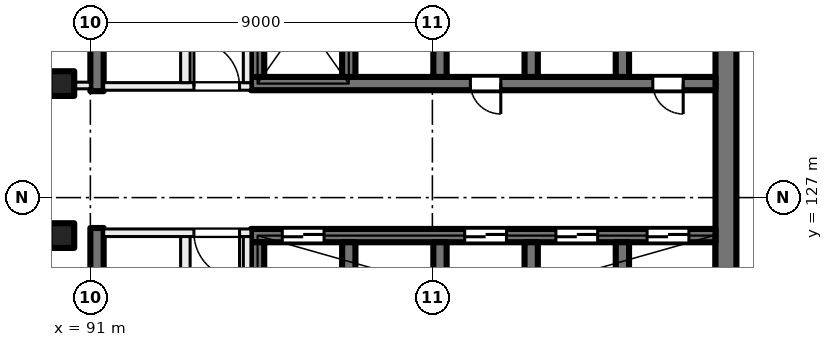
"""IFC4 building model, lengths in metres.
Left out: names, types, materials, properties, quantities, classifications, styles, units other than length and angle.
Written with IfcOpenShell. Run it as: python <this file> out.ifc"""

import sys

from ifc_helpers import new_model, si_unit, direction, frame, frame_2d, origin, origin_2d, place, context, subcontext, project, spatial, rectangle, extrude, element, fill, save


model = new_model("IFC4")
c1 = context("Model", 3, precision=1e-05, world=origin(), true_north=direction((0.0, 1.0)))
c2 = subcontext(c1, "Body", "Model", "MODEL_VIEW")
j1 = project(units=[si_unit("LENGTHUNIT", "METRE"), si_unit("PLANEANGLEUNIT", "RADIAN")], contexts=[c1])
p1 = place(None, origin())
s1 = spatial("IfcSite", under=j1, at=p1, CompositionType="ELEMENT")
p2 = place(p1, origin())
s2 = spatial("IfcBuilding", under=s1, at=p2, CompositionType="ELEMENT")
p3 = place(p2, frame((0.0, 0.0, 154.5)))
s3 = spatial("IfcBuildingStorey", under=s2, at=p3, CompositionType="ELEMENT", Elevation=154.5)
for number, where, z_axis, x_axis in (
    (1, (90.25, 130.0, 0.0), (0.0, 0.0, 1.0), (1.0, 0.0, 0.0)),
    (2, (90.25, 126.0, 0.0), (0.0, 0.0, 1.0), (1.0, 0.0, 0.0)),
):
    element("IfcColumn", number, at=place(p3, frame(where, z_axis=z_axis, x_axis=x_axis)), inside=s3, PredefinedType="COLUMN", context=c2, shape_type="SweptSolid", body=[
        extrude(rectangle(XDim=0.65, YDim=0.65, at=origin_2d()), origin(), (0.0, 0.0, 1.0), 4.0),
    ])
p4 = place(p3, frame((107.725, 135.2, 0.0), z_axis=(0.0, 0.0, 1.0), x_axis=(0.0, -1.0, 0.0)))
e3 = element("IfcWall", 3, at=p4, inside=s3, PredefinedType="SHEAR", context=c2, shape_type="SweptSolid", body=[
    extrude(rectangle(XDim=14.4, YDim=0.55, at=frame_2d((7.2, 0.0))), origin(), (0.0, 0.0, 1.0), 4.0),
])
p5 = place(p3, frame((107.45, 130.0, 0.0), z_axis=(0.0, 0.0, 1.0), x_axis=(-1.0, 0.0, 0.0)))
e4 = element("IfcWall", 4, at=p5, inside=s3, PredefinedType="SHEAR", context=c2, shape_type="SweptSolid", body=[
    extrude(rectangle(XDim=12.225, YDim=0.35, at=frame_2d((6.112, 0.0))), origin(), (0.0, 0.0, 1.0), 4.0),
])
p6 = place(p5, frame((0.85, 0.0, 0.0)))
e5 = element("IfcOpeningElement", 5, at=p6, cuts=e4, PredefinedType="OPENING", context=c2, shape_type="SweptSolid", body=[
    extrude(rectangle(XDim=0.8, YDim=2.1, at=frame_2d((0.4, 1.05))), frame((0.0, 0.185, 0.0), z_axis=(0.0, -1.0, 0.0), x_axis=(1.0, 0.0, 0.0)), (0.0, 0.0, 1.0), 0.37),
])
p7 = place(p5, frame((5.65, 0.0, 0.0)))
e6 = element("IfcOpeningElement", 6, at=p7, cuts=e4, PredefinedType="OPENING", context=c2, shape_type="SweptSolid", body=[
    extrude(rectangle(XDim=0.8, YDim=2.1, at=frame_2d((0.4, 1.05))), frame((0.0, 0.185, 0.0), z_axis=(0.0, -1.0, 0.0), x_axis=(1.0, 0.0, 0.0)), (0.0, 0.0, 1.0), 0.37),
])
for number, where, z_axis, x_axis in (
    (7, (105.0, 133.225, 0.0), (0.0, 0.0, 1.0), (0.0, -1.0, 0.0)),
    (8, (102.6, 133.225, 0.0), (0.0, 0.0, 1.0), (0.0, -1.0, 0.0)),
    (9, (100.2, 133.225, 0.0), (0.0, 0.0, 1.0), (0.0, -1.0, 0.0)),
    (10, (97.8, 133.225, 0.0), (0.0, 0.0, 1.0), (0.0, -1.0, 0.0)),
    (11, (95.4, 133.225, 0.0), (0.0, 0.0, 1.0), (0.0, -1.0, 0.0)),
):
    element("IfcWall", number, at=place(p3, frame(where, z_axis=z_axis, x_axis=x_axis)), inside=s3, PredefinedType="SHEAR", context=c2, shape_type="SweptSolid", body=[
        extrude(rectangle(XDim=3.05, YDim=0.35, at=frame_2d((1.525, 0.0))), origin(), (0.0, 0.0, 1.0), 4.0),
    ])
p8 = place(p3, frame((107.45, 126.0, 0.0), z_axis=(0.0, 0.0, 1.0), x_axis=(-1.0, 0.0, 0.0)))
e12 = element("IfcWall", 12, at=p8, inside=s3, PredefinedType="SHEAR", context=c2, shape_type="SweptSolid", body=[
    extrude(rectangle(XDim=12.225, YDim=0.35, at=frame_2d((6.112, 0.0))), origin(), (0.0, 0.0, 1.0), 4.0),
])
p9 = place(p8, frame((0.7, 0.0, 0.0)))
e13 = element("IfcOpeningElement", 13, at=p9, cuts=e12, PredefinedType="OPENING", context=c2, shape_type="SweptSolid", body=[
    extrude(rectangle(XDim=1.1, YDim=2.1, at=frame_2d((0.55, 1.05))), frame((0.0, 0.185, 0.0), z_axis=(0.0, -1.0, 0.0), x_axis=(1.0, 0.0, 0.0)), (0.0, 0.0, 1.0), 0.37),
])
p10 = place(p8, frame((3.1, 0.0, 0.0)))
e14 = element("IfcOpeningElement", 14, at=p10, cuts=e12, PredefinedType="OPENING", context=c2, shape_type="SweptSolid", body=[
    extrude(rectangle(XDim=1.1, YDim=2.1, at=frame_2d((0.55, 1.05))), frame((0.0, 0.185, 0.0), z_axis=(0.0, -1.0, 0.0), x_axis=(1.0, 0.0, 0.0)), (0.0, 0.0, 1.0), 0.37),
])
p11 = place(p8, frame((5.5, 0.0, 0.0)))
e15 = element("IfcOpeningElement", 15, at=p11, cuts=e12, PredefinedType="OPENING", context=c2, shape_type="SweptSolid", body=[
    extrude(rectangle(XDim=1.1, YDim=2.1, at=frame_2d((0.55, 1.05))), frame((0.0, 0.185, 0.0), z_axis=(0.0, -1.0, 0.0), x_axis=(1.0, 0.0, 0.0)), (0.0, 0.0, 1.0), 0.37),
])
p12 = place(p8, frame((10.3, 0.0, 0.0)))
e16 = element("IfcOpeningElement", 16, at=p12, cuts=e12, PredefinedType="OPENING", context=c2, shape_type="SweptSolid", body=[
    extrude(rectangle(XDim=1.1, YDim=2.1, at=frame_2d((0.55, 1.05))), frame((0.0, 0.185, 0.0), z_axis=(0.0, -1.0, 0.0), x_axis=(1.0, 0.0, 0.0)), (0.0, 0.0, 1.0), 0.37),
])
for number, where, z_axis, x_axis in (
    (17, (105.0, 125.825, 0.0), (0.0, 0.0, 1.0), (0.0, -1.0, 0.0)),
    (18, (102.6, 125.825, 0.0), (0.0, 0.0, 1.0), (0.0, -1.0, 0.0)),
    (19, (100.2, 125.825, 0.0), (0.0, 0.0, 1.0), (0.0, -1.0, 0.0)),
    (20, (97.8, 125.825, 0.0), (0.0, 0.0, 1.0), (0.0, -1.0, 0.0)),
    (21, (95.4, 125.825, 0.0), (0.0, 0.0, 1.0), (0.0, -1.0, 0.0)),
):
    element("IfcWall", number, at=place(p3, frame(where, z_axis=z_axis, x_axis=x_axis)), inside=s3, PredefinedType="SHEAR", context=c2, shape_type="SweptSolid", body=[
        extrude(rectangle(XDim=3.05, YDim=0.35, at=frame_2d((1.525, 0.0))), origin(), (0.0, 0.0, 1.0), 4.0),
    ])
for number, where, z_axis, x_axis in (
    (22, (91.175, 138.45, 0.0), (0.0, 0.0, 1.0), (0.0, -1.0, 0.0)),
    (23, (91.175, 126.2, 0.0), (0.0, 0.0, 1.0), (0.0, -1.0, 0.0)),
):
    element("IfcWall", number, at=place(p3, frame(where, z_axis=z_axis, x_axis=x_axis)), inside=s3, PredefinedType="SHEAR", context=c2, shape_type="SweptSolid", body=[
        extrude(rectangle(XDim=8.65, YDim=0.35, at=frame_2d((4.325, 0.0))), origin(), (0.0, 0.0, 1.0), 4.0),
    ])
p13 = place(p3, frame((95.225, 126.075, 0.0), z_axis=(0.0, 0.0, 1.0), x_axis=(-1.0, 0.0, 0.0)))
e24 = element("IfcWall", 24, at=p13, inside=s3, PredefinedType="PARTITIONING", context=c2, shape_type="SweptSolid", body=[
    extrude(rectangle(XDim=3.875, YDim=0.2, at=frame_2d((1.938, 0.0))), origin(), (0.0, 0.0, 1.0), 3.625),
])
p14 = place(p13, frame((0.3, 0.0, 0.0)))
e25 = element("IfcOpeningElement", 25, at=p14, cuts=e24, PredefinedType="OPENING", context=c2, shape_type="SweptSolid", body=[
    extrude(rectangle(XDim=1.2, YDim=2.1, at=frame_2d((0.6, 1.05))), frame((0.0, 0.11, 0.0), z_axis=(0.0, -1.0, 0.0), x_axis=(1.0, 0.0, 0.0)), (0.0, 0.0, 1.0), 0.22),
])
p15 = place(p3, frame((95.125, 117.55, 0.0), z_axis=(0.0, 0.0, 1.0), x_axis=(0.0, 1.0, 0.0)))
e26 = element("IfcWall", 26, at=p15, inside=s3, PredefinedType="PARTITIONING", context=c2, shape_type="SweptSolid", body=[
    extrude(rectangle(XDim=8.425, YDim=0.2, at=frame_2d((4.212, 0.0))), origin(), (0.0, 0.0, 1.0), 3.625),
])
p16 = place(p15, frame((1.688, 0.0, 0.0)))
e27 = element("IfcOpeningElement", 27, at=p16, cuts=e26, PredefinedType="OPENING", context=c2, shape_type="SweptSolid", body=[
    extrude(rectangle(XDim=1.5, YDim=2.1, at=frame_2d((0.75, 1.05))), frame((0.0, 0.11, 0.0), z_axis=(0.0, -1.0, 0.0), x_axis=(1.0, 0.0, 0.0)), (0.0, 0.0, 1.0), 0.22),
])
p17 = place(p3, frame((93.5, 117.55, 0.0), z_axis=(0.0, 0.0, 1.0), x_axis=(0.0, 1.0, 0.0)))
e28 = element("IfcWall", 28, at=p17, inside=s3, PredefinedType="PARTITIONING", context=c2, shape_type="SweptSolid", body=[
    extrude(rectangle(XDim=8.425, YDim=0.25, at=frame_2d((4.212, 0.0))), origin(), (0.0, 0.0, 1.0), 3.625),
])
p18 = place(p17, frame((6.647, 0.0, 0.0)))
e29 = element("IfcOpeningElement", 29, at=p18, cuts=e28, PredefinedType="OPENING", context=c2, shape_type="SweptSolid", body=[
    extrude(rectangle(XDim=0.8, YDim=2.1, at=frame_2d((0.4, 1.05))), frame((0.0, 0.135, 0.0), z_axis=(0.0, -1.0, 0.0), x_axis=(1.0, 0.0, 0.0)), (0.0, 0.0, 1.0), 0.27),
])
p19 = place(p17, frame((2.385, 0.0, 0.0)))
e30 = element("IfcOpeningElement", 30, at=p19, cuts=e28, PredefinedType="OPENING", context=c2, shape_type="SweptSolid", body=[
    extrude(rectangle(XDim=0.8, YDim=2.1, at=frame_2d((0.4, 1.05))), frame((0.0, 0.135, 0.0), z_axis=(0.0, -1.0, 0.0), x_axis=(1.0, 0.0, 0.0)), (0.0, 0.0, 1.0), 0.27),
])
p20 = place(p3, frame((91.35, 129.925, 0.0), z_axis=(0.0, 0.0, 1.0), x_axis=(1.0, 0.0, 0.0)))
e31 = element("IfcWall", 31, at=p20, inside=s3, PredefinedType="PARTITIONING", context=c2, shape_type="SweptSolid", body=[
    extrude(rectangle(XDim=3.875, YDim=0.2, at=frame_2d((1.938, 0.0))), origin(), (0.0, 0.0, 1.0), 3.625),
])
p21 = place(p20, frame((2.375, 0.0, 0.0)))
e32 = element("IfcOpeningElement", 32, at=p21, cuts=e31, PredefinedType="OPENING", context=c2, shape_type="SweptSolid", body=[
    extrude(rectangle(XDim=1.2, YDim=2.1, at=frame_2d((0.6, 1.05))), frame((0.0, 0.11, 0.0), z_axis=(0.0, -1.0, 0.0), x_axis=(1.0, 0.0, 0.0)), (0.0, 0.0, 1.0), 0.22),
])
p22 = place(p3, frame((95.125, 130.025, 0.0), z_axis=(0.0, 0.0, 1.0), x_axis=(0.0, 1.0, 0.0)))
e33 = element("IfcWall", 33, at=p22, inside=s3, PredefinedType="PARTITIONING", context=c2, shape_type="SweptSolid", body=[
    extrude(rectangle(XDim=8.425, YDim=0.2, at=frame_2d((4.212, 0.0))), origin(), (0.0, 0.0, 1.0), 3.625),
])
p23 = place(p22, frame((5.238, 0.0, 0.0)))
e34 = element("IfcOpeningElement", 34, at=p23, cuts=e33, PredefinedType="OPENING", context=c2, shape_type="SweptSolid", body=[
    extrude(rectangle(XDim=1.5, YDim=2.1, at=frame_2d((0.75, 1.05))), frame((0.0, 0.11, 0.0), z_axis=(0.0, -1.0, 0.0), x_axis=(1.0, 0.0, 0.0)), (0.0, 0.0, 1.0), 0.22),
])
p24 = place(p3, frame((93.5, 130.025, 0.0), z_axis=(0.0, 0.0, 1.0), x_axis=(0.0, 1.0, 0.0)))
e35 = element("IfcWall", 35, at=p24, inside=s3, PredefinedType="PARTITIONING", context=c2, shape_type="SweptSolid", body=[
    extrude(rectangle(XDim=8.425, YDim=0.25, at=frame_2d((4.212, 0.0))), origin(), (0.0, 0.0, 1.0), 3.625),
])
p25 = place(p24, frame((1.583, 0.0, 0.0)))
e36 = element("IfcOpeningElement", 36, at=p25, cuts=e35, PredefinedType="OPENING", context=c2, shape_type="SweptSolid", body=[
    extrude(rectangle(XDim=1.0, YDim=2.1, at=frame_2d((0.5, 1.05))), frame((0.0, 0.135, 0.0), z_axis=(0.0, -1.0, 0.0), x_axis=(1.0, 0.0, 0.0)), (0.0, 0.0, 1.0), 0.27),
])
p26 = place(p24, frame((5.845, 0.0, 0.0)))
e37 = element("IfcOpeningElement", 37, at=p26, cuts=e35, PredefinedType="OPENING", context=c2, shape_type="SweptSolid", body=[
    extrude(rectangle(XDim=1.0, YDim=2.1, at=frame_2d((0.5, 1.05))), frame((0.0, 0.135, 0.0), z_axis=(0.0, -1.0, 0.0), x_axis=(1.0, 0.0, 0.0)), (0.0, 0.0, 1.0), 0.27),
])
p27 = place(p3, frame((85.838, 129.95, 0.0), z_axis=(0.0, 0.0, 1.0), x_axis=(1.0, 0.0, 0.0)))
e38 = element("IfcWall", 38, at=p27, inside=s3, PredefinedType="PARTITIONING", context=c2, shape_type="SweptSolid", body=[
    extrude(rectangle(XDim=5.162, YDim=0.175, at=frame_2d((2.581, 0.0))), origin(), (0.0, 0.0, 1.0), 3.625),
])
p28 = place(p27, frame((1.971, 0.0, 0.0)))
e39 = element("IfcOpeningElement", 39, at=p28, cuts=e38, PredefinedType="OPENING", context=c2, shape_type="SweptSolid", body=[
    extrude(rectangle(XDim=1.2, YDim=2.1, at=frame_2d((0.6, 1.05))), frame((0.0, 0.097, 0.0), z_axis=(0.0, -1.0, 0.0), x_axis=(1.0, 0.0, 0.0)), (0.0, 0.0, 1.0), 0.195),
])
p29 = place(p9, origin())
e40 = element("IfcDoor", 40, at=p29, inside=s3, OperationType="DOUBLE_DOOR_SLIDING", PredefinedType="DOOR", context=c2, shape_type="SweptSolid", body=[
    extrude(rectangle(XDim=1.1, YDim=2.1, at=frame_2d((0.55, 1.05))), frame((0.0, 0.025, 0.0), z_axis=(0.0, -1.0, 0.0), x_axis=(1.0, 0.0, 0.0)), (0.0, 0.0, 1.0), 0.05),
])
fill(e13, e40)
p30 = place(p10, origin())
e41 = element("IfcDoor", 41, at=p30, inside=s3, OperationType="DOUBLE_DOOR_SLIDING", PredefinedType="DOOR", context=c2, shape_type="SweptSolid", body=[
    extrude(rectangle(XDim=1.1, YDim=2.1, at=frame_2d((0.55, 1.05))), frame((0.0, 0.025, 0.0), z_axis=(0.0, -1.0, 0.0), x_axis=(1.0, 0.0, 0.0)), (0.0, 0.0, 1.0), 0.05),
])
fill(e14, e41)
p31 = place(p11, origin())
e42 = element("IfcDoor", 42, at=p31, inside=s3, OperationType="DOUBLE_DOOR_SLIDING", PredefinedType="DOOR", context=c2, shape_type="SweptSolid", body=[
    extrude(rectangle(XDim=1.1, YDim=2.1, at=frame_2d((0.55, 1.05))), frame((0.0, 0.025, 0.0), z_axis=(0.0, -1.0, 0.0), x_axis=(1.0, 0.0, 0.0)), (0.0, 0.0, 1.0), 0.05),
])
fill(e15, e42)
p32 = place(p12, origin())
e43 = element("IfcDoor", 43, at=p32, inside=s3, OperationType="DOUBLE_DOOR_SLIDING", PredefinedType="DOOR", context=c2, shape_type="SweptSolid", body=[
    extrude(rectangle(XDim=1.1, YDim=2.1, at=frame_2d((0.55, 1.05))), frame((0.0, 0.025, 0.0), z_axis=(0.0, -1.0, 0.0), x_axis=(1.0, 0.0, 0.0)), (0.0, 0.0, 1.0), 0.05),
])
fill(e16, e43)
p33 = place(p6, origin())
e44 = element("IfcDoor", 44, at=p33, inside=s3, OperationType="SINGLE_SWING_LEFT", PredefinedType="DOOR", context=c2, shape_type="SweptSolid", body=[
    extrude(rectangle(XDim=0.8, YDim=2.1, at=frame_2d((0.4, 1.05))), frame((0.0, 0.025, 0.0), z_axis=(0.0, -1.0, 0.0), x_axis=(1.0, 0.0, 0.0)), (0.0, 0.0, 1.0), 0.05),
])
fill(e5, e44)
p34 = place(p7, origin())
e45 = element("IfcDoor", 45, at=p34, inside=s3, OperationType="SINGLE_SWING_RIGHT", PredefinedType="DOOR", context=c2, shape_type="SweptSolid", body=[
    extrude(rectangle(XDim=0.8, YDim=2.1, at=frame_2d((0.4, 1.05))), frame((0.0, 0.025, 0.0), z_axis=(0.0, -1.0, 0.0), x_axis=(1.0, 0.0, 0.0)), (0.0, 0.0, 1.0), 0.05),
])
fill(e6, e45)
p35 = place(p14, origin())
e46 = element("IfcDoor", 46, at=p35, inside=s3, OperationType="DOUBLE_DOOR_SINGLE_SWING", PredefinedType="DOOR", context=c2, shape_type="SweptSolid", body=[
    extrude(rectangle(XDim=1.2, YDim=2.1, at=frame_2d((0.6, 1.05))), frame((0.0, 0.025, 0.0), z_axis=(0.0, -1.0, 0.0), x_axis=(1.0, 0.0, 0.0)), (0.0, 0.0, 1.0), 0.05),
])
fill(e25, e46)
p36 = place(p21, origin())
e47 = element("IfcDoor", 47, at=p36, inside=s3, OperationType="DOUBLE_DOOR_SINGLE_SWING", PredefinedType="DOOR", context=c2, shape_type="SweptSolid", body=[
    extrude(rectangle(XDim=1.2, YDim=2.1, at=frame_2d((0.6, 1.05))), frame((0.0, 0.025, 0.0), z_axis=(0.0, -1.0, 0.0), x_axis=(1.0, 0.0, 0.0)), (0.0, 0.0, 1.0), 0.05),
])
fill(e32, e47)
save(model, sys.argv[1])
